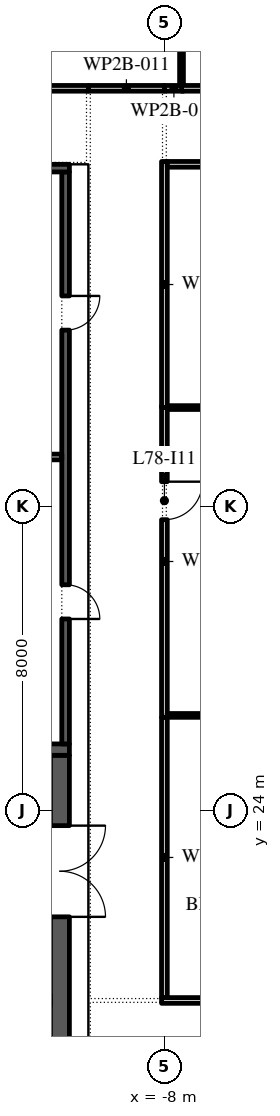
"""IFC4 building model, lengths in metres.
Left out: names, types, materials, properties, quantities, classifications, styles, units other than length and angle.
Written with IfcOpenShell. Run it as: python <this file> out.ifc"""

import sys

from ifc_helpers import new_model, si_unit, direction, frame, frame_2d, origin, place, context, subcontext, project, spatial, rectangle, extrude, element, fill, save


model = new_model("IFC4")
c1 = context("Model", 3, precision=1e-05, world=origin(), true_north=direction((0.0, 1.0)))
c2 = subcontext(c1, "Body", "Model", "MODEL_VIEW")
j1 = project(units=[si_unit("LENGTHUNIT", "METRE"), si_unit("PLANEANGLEUNIT", "RADIAN")], contexts=[c1])
p1 = place(None, origin())
s1 = spatial("IfcSite", under=j1, at=p1, CompositionType="ELEMENT")
p2 = place(p1, origin())
s2 = spatial("IfcBuilding", under=s1, at=p2, CompositionType="ELEMENT")
p3 = place(p2, frame((0.0, 0.0, 355.2)))
s3 = spatial("IfcBuildingStorey", under=s2, at=p3, CompositionType="ELEMENT", Elevation=355.2)
p4 = place(p3, frame((-10.75, -2.45, 0.0), z_axis=(0.0, 0.0, 1.0), x_axis=(0.0, 1.0, 0.0)))
e1 = element("IfcWall", 1, at=p4, inside=s3, PredefinedType="SHEAR", context=c2, shape_type="SweptSolid", body=[
    extrude(rectangle(XDim=27.9, YDim=0.5, at=frame_2d((13.95, 0.0))), origin(), (0.0, 0.0, 1.0), 3.95),
])
p5 = place(p4, frame((23.65, 0.0, 0.0)))
e2 = element("IfcOpeningElement", 2, at=p5, cuts=e1, PredefinedType="OPENING", context=c2, shape_type="SweptSolid", body=[
    extrude(rectangle(XDim=2.4, YDim=2.1, at=frame_2d((1.2, 1.05))), frame((0.0, 0.26, 0.0), z_axis=(0.0, -1.0, 0.0), x_axis=(1.0, 0.0, 0.0)), (0.0, 0.0, 1.0), 0.52),
])
p6 = place(p4, frame((1.087, 0.0, 0.0)))
e3 = element("IfcOpeningElement", 3, at=p6, cuts=e1, PredefinedType="OPENING", context=c2, shape_type="SweptSolid", body=[
    extrude(rectangle(XDim=0.9, YDim=2.1, at=frame_2d((0.45, 1.05))), frame((0.0, 0.26, 0.0), z_axis=(0.0, -1.0, 0.0), x_axis=(1.0, 0.0, 0.0)), (0.0, 0.0, 1.0), 0.52),
])
p7 = place(p4, frame((4.262, 0.0, 0.0)))
e4 = element("IfcOpeningElement", 4, at=p7, cuts=e1, PredefinedType="OPENING", context=c2, shape_type="SweptSolid", body=[
    extrude(rectangle(XDim=1.0, YDim=2.1, at=frame_2d((0.5, 1.05))), frame((0.0, 0.26, 0.0), z_axis=(0.0, -1.0, 0.0), x_axis=(1.0, 0.0, 0.0)), (0.0, 0.0, 1.0), 0.52),
])
p8 = place(p3, frame((-21.5, 25.6, 0.0), z_axis=(0.0, 0.0, 1.0), x_axis=(1.0, 0.0, 0.0)))
e5 = element("IfcWall", 5, at=p8, inside=s3, PredefinedType="SHEAR", context=c2, shape_type="SweptSolid", body=[
    extrude(rectangle(XDim=11.0, YDim=0.3, at=frame_2d((5.5, 0.0))), origin(), (0.0, 0.0, 1.0), 3.95),
])
p9 = place(p3, frame((-10.6, 25.75, 0.0), z_axis=(0.0, 0.0, 1.0), x_axis=(0.0, 1.0, 0.0)))
e6 = element("IfcWall", 6, at=p9, inside=s3, PredefinedType="SHEAR", context=c2, shape_type="SweptSolid", body=[
    extrude(rectangle(XDim=15.05, YDim=0.2, at=frame_2d((7.525, 0.0))), origin(), (0.0, 0.0, 1.0), 3.95),
])
p10 = place(p9, frame((3.288, 0.0, 0.0)))
e7 = element("IfcOpeningElement", 7, at=p10, cuts=e6, PredefinedType="OPENING", context=c2, shape_type="SweptSolid", body=[
    extrude(rectangle(XDim=0.9, YDim=2.1, at=frame_2d((0.45, 1.05))), frame((0.0, 0.11, 0.0), z_axis=(0.0, -1.0, 0.0), x_axis=(1.0, 0.0, 0.0)), (0.0, 0.0, 1.0), 0.22),
])
p11 = place(p9, frame((10.887, 0.0, 0.0)))
e8 = element("IfcOpeningElement", 8, at=p11, cuts=e6, PredefinedType="OPENING", context=c2, shape_type="SweptSolid", body=[
    extrude(rectangle(XDim=0.9, YDim=2.1, at=frame_2d((0.45, 1.05))), frame((0.0, 0.11, 0.0), z_axis=(0.0, -1.0, 0.0), x_axis=(1.0, 0.0, 0.0)), (0.0, 0.0, 1.0), 0.22),
])
p12 = place(p3, frame((-21.5, 40.9, 0.0), z_axis=(0.0, 0.0, 1.0), x_axis=(1.0, 0.0, 0.0)))
e9 = element("IfcWall", 9, at=p12, inside=s3, PredefinedType="SHEAR", context=c2, shape_type="SweptSolid", body=[
    extrude(rectangle(XDim=11.0, YDim=0.2, at=frame_2d((5.5, 0.0))), origin(), (0.0, 0.0, 1.0), 3.95),
])
p13 = place(p3, frame((-16.0, 33.3, 0.0), z_axis=(0.0, 0.0, 1.0), x_axis=(1.0, 0.0, 0.0)))
e10 = element("IfcWall", 10, at=p13, inside=s3, PredefinedType="PARTITIONING", context=c2, shape_type="SweptSolid", body=[
    extrude(rectangle(XDim=5.3, YDim=0.15, at=frame_2d((2.65, 0.0))), origin(), (0.0, 0.0, 1.0), 3.95),
])
p14 = place(p3, frame((-15.1, 43.0, 0.0), z_axis=(0.0, 0.0, 1.0), x_axis=(1.0, 0.0, 0.0)))
e11 = element("IfcWall", 11, at=p14, inside=s3, PredefinedType="PARTITIONING", context=c2, shape_type="SweptSolid", body=[
    extrude(rectangle(XDim=5.1, YDim=0.15, at=frame_2d((2.55, 0.0))), origin(), (0.0, 0.0, 1.0), 3.95),
])
p15 = place(p14, frame((1.95, 0.0, 0.0)))
e12 = element("IfcOpeningElement", 12, at=p15, cuts=e11, PredefinedType="OPENING", context=c2, shape_type="SweptSolid", body=[
    extrude(rectangle(XDim=1.0, YDim=2.1, at=frame_2d((0.5, 1.05))), frame((0.0, 0.085, 0.0), z_axis=(0.0, -1.0, 0.0), x_axis=(1.0, 0.0, 0.0)), (0.0, 0.0, 1.0), 0.17),
])
p16 = place(p3, frame((-10.0, 43.0, 0.0), z_axis=(0.0, 0.0, 1.0), x_axis=(1.0, 0.0, 0.0)))
e13 = element("IfcWall", 13, at=p16, inside=s3, PredefinedType="PARTITIONING", context=c2, shape_type="SweptSolid", body=[
    extrude(rectangle(XDim=2.0, YDim=0.15, at=frame_2d((1.0, 0.0))), origin(), (0.0, 0.0, 1.0), 3.95),
])
p17 = place(p3, frame((-8.075, 19.0, 0.0), z_axis=(0.0, 0.0, 1.0), x_axis=(1.0, 0.0, 0.0)))
e14 = element("IfcWall", 14, at=p17, inside=s3, PredefinedType="PARTITIONING", context=c2, shape_type="SweptSolid", body=[
    extrude(rectangle(XDim=8.125, YDim=0.15, at=frame_2d((4.062, 0.0))), origin(), (0.0, 0.0, 1.0), 3.95),
])
p18 = place(p17, frame((4.425, 0.0, 0.0)))
e15 = element("IfcOpeningElement", 15, at=p18, cuts=e14, PredefinedType="OPENING", context=c2, shape_type="SweptSolid", body=[
    extrude(rectangle(XDim=1.0, YDim=2.1, at=frame_2d((0.5, 1.05))), frame((0.0, 0.085, 0.0), z_axis=(0.0, -1.0, 0.0), x_axis=(1.0, 0.0, 0.0)), (0.0, 0.0, 1.0), 0.17),
])
p19 = place(p3, frame((-8.0, 26.45, 0.0), z_axis=(0.0, 0.0, 1.0), x_axis=(0.0, -1.0, 0.0)))
e16 = element("IfcWall", 16, at=p19, inside=s3, PredefinedType="PARTITIONING", context=c2, shape_type="SweptSolid", body=[
    extrude(rectangle(XDim=7.375, YDim=0.15, at=frame_2d((3.688, 0.0))), origin(), (0.0, 0.0, 1.0), 3.95),
])
p20 = place(p3, frame((-8.0, 34.65, 0.0), z_axis=(0.0, 0.0, 1.0), x_axis=(0.0, -1.0, 0.0)))
e17 = element("IfcWall", 17, at=p20, inside=s3, PredefinedType="PARTITIONING", context=c2, shape_type="SweptSolid", body=[
    extrude(rectangle(XDim=8.2, YDim=0.15, at=frame_2d((4.1, 0.0))), origin(), (0.0, 0.0, 1.0), 3.95),
])
p21 = place(p20, frame((2.0, 0.0, 0.0)))
e18 = element("IfcOpeningElement", 18, at=p21, cuts=e17, PredefinedType="OPENING", context=c2, shape_type="SweptSolid", body=[
    extrude(rectangle(XDim=1.0, YDim=2.1, at=frame_2d((0.5, 1.05))), frame((0.0, 0.085, 0.0), z_axis=(0.0, -1.0, 0.0), x_axis=(1.0, 0.0, 0.0)), (0.0, 0.0, 1.0), 0.17),
])
p22 = place(p3, frame((-7.925, 34.6, 0.0), z_axis=(0.0, 0.0, 1.0), x_axis=(1.0, 0.0, 0.0)))
e19 = element("IfcWall", 19, at=p22, inside=s3, PredefinedType="PARTITIONING", context=c2, shape_type="SweptSolid", body=[
    extrude(rectangle(XDim=16.0, YDim=0.1, at=frame_2d((8.0, 0.0))), origin(), (0.0, 0.0, 1.0), 3.95),
])
p23 = place(p3, frame((-8.0, 41.075, 0.0), z_axis=(0.0, 0.0, 1.0), x_axis=(0.0, -1.0, 0.0)))
e20 = element("IfcWall", 20, at=p23, inside=s3, PredefinedType="PARTITIONING", context=c2, shape_type="SweptSolid", body=[
    extrude(rectangle(XDim=6.475, YDim=0.15, at=frame_2d((3.237, 0.0))), origin(), (0.0, 0.0, 1.0), 3.95),
])
p24 = place(p3, frame((-8.0, 43.0, 0.0), z_axis=(0.0, 0.0, 1.0), x_axis=(1.0, 0.0, 0.0)))
e21 = element("IfcWall", 21, at=p24, inside=s3, PredefinedType="PARTITIONING", context=c2, shape_type="SweptSolid", body=[
    extrude(rectangle(XDim=0.5, YDim=0.15, at=frame_2d((0.25, 0.0))), origin(), (0.0, 0.0, 1.0), 3.95),
])
p25 = place(p3, frame((-7.55, 43.075, 0.0), z_axis=(0.0, 0.0, 1.0), x_axis=(0.0, 1.0, 0.0)))
e22 = element("IfcWall", 22, at=p25, inside=s3, PredefinedType="PARTITIONING", context=c2, shape_type="SweptSolid", body=[
    extrude(rectangle(XDim=3.875, YDim=0.1, at=frame_2d((1.938, 0.0))), origin(), (0.0, 0.0, 1.0), 3.031),
])
p26 = place(p3, frame((-7.55, 43.0, 0.0), z_axis=(0.0, 0.0, 1.0), x_axis=(1.0, 0.0, 0.0)))
e23 = element("IfcWall", 23, at=p26, inside=s3, PredefinedType="PARTITIONING", context=c2, shape_type="SweptSolid", body=[
    extrude(rectangle(XDim=7.6, YDim=0.15, at=frame_2d((3.8, 0.0))), origin(), (0.0, 0.0, 1.0), 3.95),
])
p27 = place(p26, frame((4.15, 0.0, 0.0)))
e24 = element("IfcOpeningElement", 24, at=p27, cuts=e23, PredefinedType="OPENING", context=c2, shape_type="SweptSolid", body=[
    extrude(rectangle(XDim=1.0, YDim=2.1, at=frame_2d((0.5, 1.05))), frame((0.0, 0.085, 0.0), z_axis=(0.0, -1.0, 0.0), x_axis=(1.0, 0.0, 0.0)), (0.0, 0.0, 1.0), 0.17),
])
p28 = place(p3, frame((-0.05, 26.5, 0.0), z_axis=(0.0, 0.0, 1.0), x_axis=(-1.0, 0.0, 0.0)))
e25 = element("IfcWall", 25, at=p28, inside=s3, PredefinedType="PARTITIONING", context=c2, shape_type="SweptSolid", body=[
    extrude(rectangle(XDim=7.875, YDim=0.1, at=frame_2d((3.938, 0.0))), origin(), (0.0, 0.0, 1.0), 3.95),
])
p29 = place(p3, frame((7.925, 41.0, 0.0), z_axis=(0.0, 0.0, 1.0), x_axis=(-1.0, 0.0, 0.0)))
e26 = element("IfcWall", 26, at=p29, inside=s3, PredefinedType="PARTITIONING", context=c2, shape_type="SweptSolid", body=[
    extrude(rectangle(XDim=15.85, YDim=0.15, at=frame_2d((7.925, 0.0))), origin(), (0.0, 0.0, 1.0), 3.95),
])
p30 = place(p29, frame((9.025, 0.0, 0.0)))
e27 = element("IfcOpeningElement", 27, at=p30, cuts=e26, PredefinedType="OPENING", context=c2, shape_type="SweptSolid", body=[
    extrude(rectangle(XDim=1.0, YDim=2.1, at=frame_2d((0.5, 1.05))), frame((0.0, 0.085, 0.0), z_axis=(0.0, -1.0, 0.0), x_axis=(1.0, 0.0, 0.0)), (0.0, 0.0, 1.0), 0.17),
])
p31 = place(p5, frame((2.4, 0.0, 0.0), z_axis=(0.0, 0.0, 1.0), x_axis=(-1.0, 0.0, 0.0)))
e28 = element("IfcDoor", 28, at=p31, inside=s3, OperationType="DOUBLE_DOOR_SINGLE_SWING", PredefinedType="DOOR", context=c2, shape_type="SweptSolid", body=[
    extrude(rectangle(XDim=2.4, YDim=2.1, at=frame_2d((1.2, 1.05))), frame((0.0, 0.025, 0.0), z_axis=(0.0, -1.0, 0.0), x_axis=(1.0, 0.0, 0.0)), (0.0, 0.0, 1.0), 0.05),
])
fill(e2, e28)
p32 = place(p10, frame((0.9, 0.15, 0.0), z_axis=(0.0, 0.0, 1.0), x_axis=(-1.0, 0.0, 0.0)))
e29 = element("IfcDoor", 29, at=p32, inside=s3, OperationType="SINGLE_SWING_LEFT", PredefinedType="DOOR", context=c2, shape_type="SweptSolid", body=[
    extrude(rectangle(XDim=0.9, YDim=2.1, at=frame_2d((0.45, 1.05))), frame((0.0, 0.1, 0.0), z_axis=(0.0, -1.0, 0.0), x_axis=(1.0, 0.0, 0.0)), (0.0, 0.0, 1.0), 0.05),
])
fill(e7, e29)
p33 = place(p11, frame((0.9, 0.15, 0.0), z_axis=(0.0, 0.0, 1.0), x_axis=(-1.0, 0.0, 0.0)))
e30 = element("IfcDoor", 30, at=p33, inside=s3, OperationType="SINGLE_SWING_RIGHT", PredefinedType="DOOR", context=c2, shape_type="SweptSolid", body=[
    extrude(rectangle(XDim=0.9, YDim=2.1, at=frame_2d((0.45, 1.05))), frame((0.0, 0.1, 0.0), z_axis=(0.0, -1.0, 0.0), x_axis=(1.0, 0.0, 0.0)), (0.0, 0.0, 1.0), 0.05),
])
fill(e8, e30)
p34 = place(p21, origin())
e31 = element("IfcDoor", 31, at=p34, inside=s3, OperationType="SINGLE_SWING_RIGHT", PredefinedType="DOOR", context=c2, shape_type="SweptSolid", body=[
    extrude(rectangle(XDim=1.0, YDim=2.1, at=frame_2d((0.5, 1.05))), frame((0.0, 0.025, 0.0), z_axis=(0.0, -1.0, 0.0), x_axis=(1.0, 0.0, 0.0)), (0.0, 0.0, 1.0), 0.05),
])
fill(e18, e31)
save(model, sys.argv[1])
